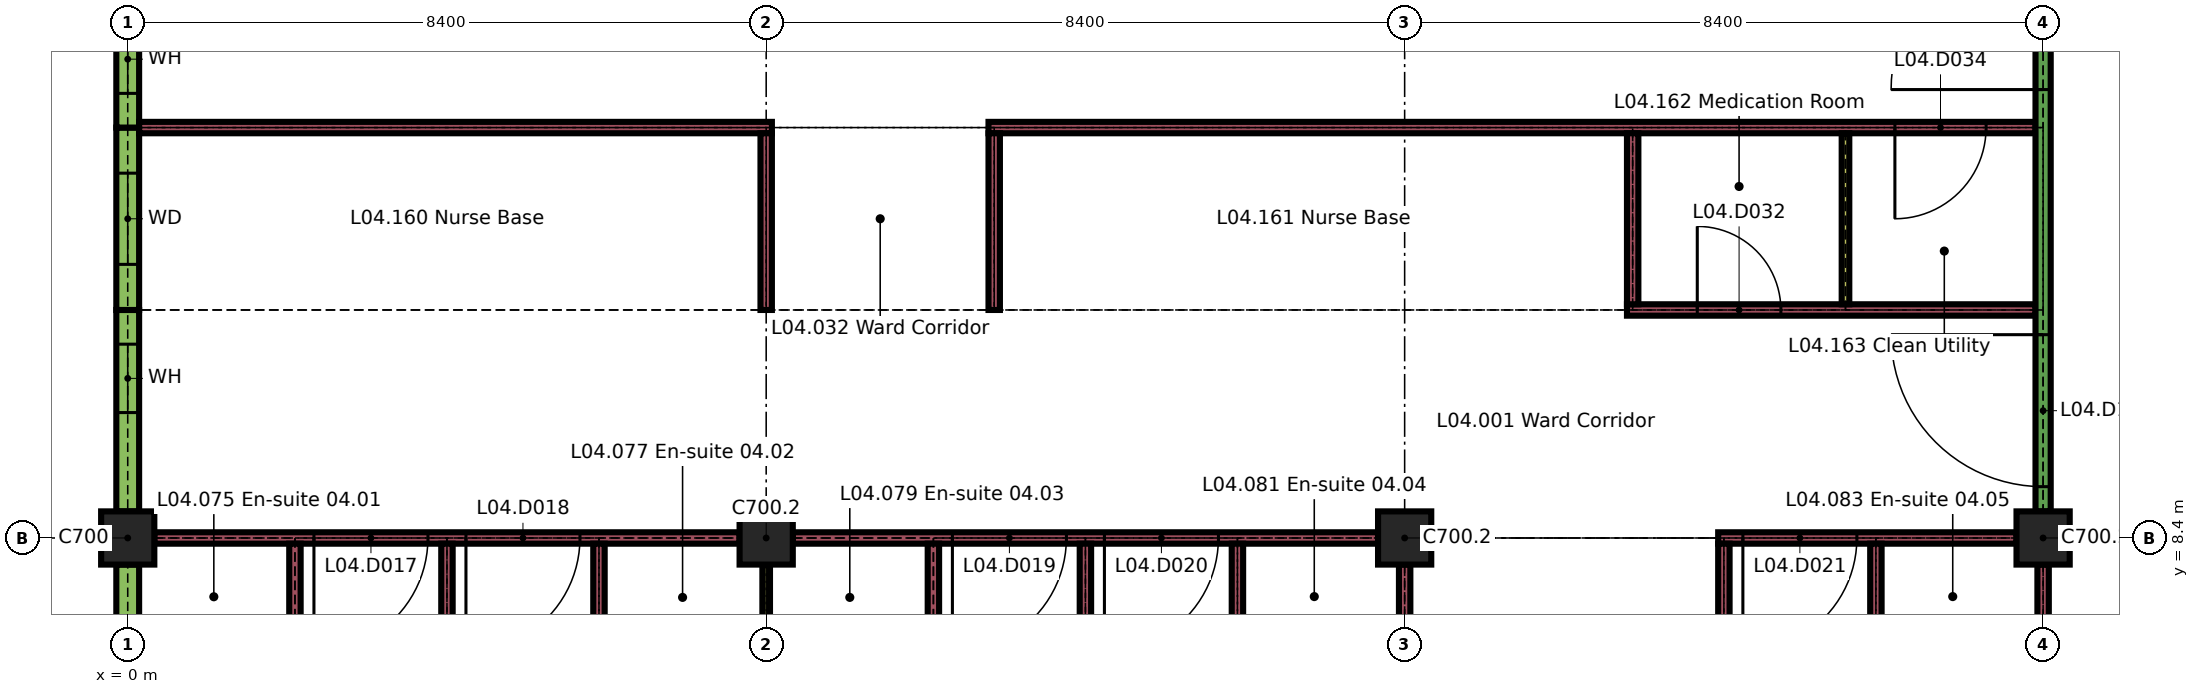
"""IFC4 building model, lengths in metres.
Left out: names, types, materials, properties, quantities, classifications, styles, units other than length and angle.
Written with IfcOpenShell. Run it as: python <this file> out.ifc"""

import sys

from ifc_helpers import new_model, si_unit, direction, frame, frame_2d, origin, origin_2d, place, context, subcontext, project, spatial, rectangle, extrude, element, fill, save


model = new_model("IFC4")
c1 = context("Model", 3, precision=1e-05, world=origin(), true_north=direction((0.0, 1.0)))
c2 = subcontext(c1, "Body", "Model", "MODEL_VIEW")
j1 = project(units=[si_unit("LENGTHUNIT", "METRE"), si_unit("PLANEANGLEUNIT", "RADIAN")], contexts=[c1])
p1 = place(None, origin())
s1 = spatial("IfcSite", under=j1, at=p1, CompositionType="ELEMENT")
p2 = place(p1, origin())
s2 = spatial("IfcBuilding", under=s1, at=p2, CompositionType="ELEMENT")
p3 = place(p2, frame((0.0, 0.0, 18.9)))
s3 = spatial("IfcBuildingStorey", under=s2, at=p3, CompositionType="ELEMENT", Elevation=18.9)
for number, where, z_axis, x_axis in (
    (1, (0.0, 8.4, 0.0), (0.0, 0.0, 1.0), (1.0, 0.0, 0.0)),
    (2, (8.4, 8.4, 0.0), (0.0, 0.0, 1.0), (1.0, 0.0, 0.0)),
    (3, (16.8, 8.4, 0.0), (0.0, 0.0, 1.0), (1.0, 0.0, 0.0)),
    (4, (25.2, 8.4, 0.0), (0.0, 0.0, 1.0), (1.0, 0.0, 0.0)),
):
    element("IfcColumn", number, at=place(p3, frame(where, z_axis=z_axis, x_axis=x_axis)), inside=s3, PredefinedType="COLUMN", context=c2, shape_type="SweptSolid", body=[
        extrude(rectangle(XDim=0.7, YDim=0.7, at=origin_2d()), origin(), (0.0, 0.0, 1.0), 3.26),
    ])
p4 = place(p3, frame((0.0, 6.0, 0.0), z_axis=(0.0, 0.0, 1.0), x_axis=(0.0, 1.0, 0.0)))
e5 = element("IfcWall", 5, at=p4, inside=s3, PredefinedType="SOLIDWALL", context=c2, shape_type="SweptSolid", body=[
    extrude(rectangle(XDim=2.05, YDim=0.3, at=frame_2d((1.025, 0.0))), origin(), (0.0, 0.0, 1.0), 2.96),
])
p5 = place(p3, frame((0.0, 8.75, 0.0), z_axis=(0.0, 0.0, 1.0), x_axis=(0.0, 1.0, 0.0)))
e6 = element("IfcWall", 6, at=p5, inside=s3, PredefinedType="SOLIDWALL", context=c2, shape_type="SweptSolid", body=[
    extrude(rectangle(XDim=2.65, YDim=0.3, at=frame_2d((1.325, 0.0))), origin(), (0.0, 0.0, 1.0), 2.96),
])
p6 = place(p5, frame((1.3, 0.0, 0.9)))
e7 = element("IfcOpeningElement", 7, at=p6, cuts=e6, PredefinedType="OPENING", context=c2, shape_type="SweptSolid", body=[
    extrude(rectangle(XDim=0.9, YDim=1.5, at=frame_2d((0.45, 0.75))), frame((0.0, 0.16, 0.0), z_axis=(0.0, -1.0, 0.0), x_axis=(1.0, 0.0, 0.0)), (0.0, 0.0, 1.0), 0.32),
])
p7 = place(p3, frame((0.0, 11.4, 0.0), z_axis=(0.0, 0.0, 1.0), x_axis=(0.0, 1.0, 0.0)))
e8 = element("IfcWall", 8, at=p7, inside=s3, PredefinedType="SOLIDWALL", context=c2, shape_type="SweptSolid", body=[
    extrude(rectangle(XDim=2.4, YDim=0.3, at=frame_2d((1.2, 0.0))), origin(), (0.0, 0.0, 1.0), 2.96),
])
p8 = place(p7, frame((0.6, 0.0, 0.9)))
e9 = element("IfcOpeningElement", 9, at=p8, cuts=e8, PredefinedType="OPENING", context=c2, shape_type="SweptSolid", body=[
    extrude(rectangle(XDim=1.2, YDim=1.5, at=frame_2d((0.6, 0.75))), frame((0.0, 0.16, 0.0), z_axis=(0.0, -1.0, 0.0), x_axis=(1.0, 0.0, 0.0)), (0.0, 0.0, 1.0), 0.32),
])
p9 = place(p3, frame((0.0, 13.8, 0.0), z_axis=(0.0, 0.0, 1.0), x_axis=(0.0, 1.0, 0.0)))
e10 = element("IfcWall", 10, at=p9, inside=s3, PredefinedType="SOLIDWALL", context=c2, shape_type="SweptSolid", body=[
    extrude(rectangle(XDim=3.0, YDim=0.3, at=frame_2d((1.5, 0.0))), origin(), (0.0, 0.0, 1.0), 2.96),
])
p10 = place(p9, frame((0.45, 0.0, 0.9)))
e11 = element("IfcOpeningElement", 11, at=p10, cuts=e10, PredefinedType="OPENING", context=c2, shape_type="SweptSolid", body=[
    extrude(rectangle(XDim=0.9, YDim=1.5, at=frame_2d((0.45, 0.75))), frame((0.0, 0.16, 0.0), z_axis=(0.0, -1.0, 0.0), x_axis=(1.0, 0.0, 0.0)), (0.0, 0.0, 1.0), 0.32),
])
p11 = place(p3, frame((0.35, 8.4, 0.0), z_axis=(0.0, 0.0, 1.0), x_axis=(1.0, 0.0, 0.0)))
e12 = element("IfcWall", 12, at=p11, inside=s3, PredefinedType="PARTITIONING", context=c2, shape_type="SweptSolid", body=[
    extrude(rectangle(XDim=7.7, YDim=0.15, at=frame_2d((3.85, 0.0))), origin(), (0.0, 0.0, 1.0), 3.26),
])
p12 = place(p11, frame((2.1, 0.0, 0.0)))
e13 = element("IfcOpeningElement", 13, at=p12, cuts=e12, PredefinedType="OPENING", context=c2, shape_type="SweptSolid", body=[
    extrude(rectangle(XDim=1.5, YDim=2.4, at=frame_2d((0.75, 1.2))), frame((0.0, 0.085, 0.0), z_axis=(0.0, -1.0, 0.0), x_axis=(1.0, 0.0, 0.0)), (0.0, 0.0, 1.0), 0.17),
])
p13 = place(p11, frame((4.1, 0.0, 0.0)))
e14 = element("IfcOpeningElement", 14, at=p13, cuts=e12, PredefinedType="OPENING", context=c2, shape_type="SweptSolid", body=[
    extrude(rectangle(XDim=1.5, YDim=2.4, at=frame_2d((0.75, 1.2))), frame((0.0, 0.085, 0.0), z_axis=(0.0, -1.0, 0.0), x_axis=(1.0, 0.0, 0.0)), (0.0, 0.0, 1.0), 0.17),
])
p14 = place(p3, frame((8.75, 8.4, 0.0), z_axis=(0.0, 0.0, 1.0), x_axis=(1.0, 0.0, 0.0)))
e15 = element("IfcWall", 15, at=p14, inside=s3, PredefinedType="PARTITIONING", context=c2, shape_type="SweptSolid", body=[
    extrude(rectangle(XDim=7.7, YDim=0.15, at=frame_2d((3.85, 0.0))), origin(), (0.0, 0.0, 1.0), 3.26),
])
p15 = place(p14, frame((2.1, 0.0, 0.0)))
e16 = element("IfcOpeningElement", 16, at=p15, cuts=e15, PredefinedType="OPENING", context=c2, shape_type="SweptSolid", body=[
    extrude(rectangle(XDim=1.5, YDim=2.4, at=frame_2d((0.75, 1.2))), frame((0.0, 0.085, 0.0), z_axis=(0.0, -1.0, 0.0), x_axis=(1.0, 0.0, 0.0)), (0.0, 0.0, 1.0), 0.17),
])
p16 = place(p14, frame((4.1, 0.0, 0.0)))
e17 = element("IfcOpeningElement", 17, at=p16, cuts=e15, PredefinedType="OPENING", context=c2, shape_type="SweptSolid", body=[
    extrude(rectangle(XDim=1.5, YDim=2.4, at=frame_2d((0.75, 1.2))), frame((0.0, 0.085, 0.0), z_axis=(0.0, -1.0, 0.0), x_axis=(1.0, 0.0, 0.0)), (0.0, 0.0, 1.0), 0.17),
])
p17 = place(p3, frame((20.925, 8.4, 0.0), z_axis=(0.0, 0.0, 1.0), x_axis=(1.0, 0.0, 0.0)))
e18 = element("IfcWall", 18, at=p17, inside=s3, PredefinedType="PARTITIONING", context=c2, shape_type="SweptSolid", body=[
    extrude(rectangle(XDim=3.925, YDim=0.15, at=frame_2d((1.962, 0.0))), origin(), (0.0, 0.0, 1.0), 3.26),
])
p18 = place(p17, frame((0.325, 0.0, 0.0)))
e19 = element("IfcOpeningElement", 19, at=p18, cuts=e18, PredefinedType="OPENING", context=c2, shape_type="SweptSolid", body=[
    extrude(rectangle(XDim=1.5, YDim=2.4, at=frame_2d((0.75, 1.2))), frame((0.0, 0.085, 0.0), z_axis=(0.0, -1.0, 0.0), x_axis=(1.0, 0.0, 0.0)), (0.0, 0.0, 1.0), 0.17),
])
p19 = place(p3, frame((19.725, 11.4, 0.0), z_axis=(0.0, 0.0, 1.0), x_axis=(1.0, 0.0, 0.0)))
e20 = element("IfcWall", 20, at=p19, inside=s3, PredefinedType="PARTITIONING", context=c2, shape_type="SweptSolid", body=[
    extrude(rectangle(XDim=5.375, YDim=0.15, at=frame_2d((2.688, 0.0))), origin(), (0.0, 0.0, 1.0), 3.26),
])
p20 = place(p19, frame((0.925, 0.0, 0.0)))
e21 = element("IfcOpeningElement", 21, at=p20, cuts=e20, PredefinedType="OPENING", context=c2, shape_type="SweptSolid", body=[
    extrude(rectangle(XDim=1.1, YDim=2.1, at=frame_2d((0.55, 1.05))), frame((0.0, 0.085, 0.0), z_axis=(0.0, -1.0, 0.0), x_axis=(1.0, 0.0, 0.0)), (0.0, 0.0, 1.0), 0.17),
])
p21 = place(p3, frame((0.15, 13.8, 0.0), z_axis=(0.0, 0.0, 1.0), x_axis=(1.0, 0.0, 0.0)))
e22 = element("IfcWall", 22, at=p21, inside=s3, PredefinedType="PARTITIONING", context=c2, shape_type="SweptSolid", body=[
    extrude(rectangle(XDim=8.325, YDim=0.15, at=frame_2d((4.163, 0.0))), origin(), (0.0, 0.0, 1.0), 3.26),
])
p22 = place(p3, frame((11.325, 13.8, 0.0), z_axis=(0.0, 0.0, 1.0), x_axis=(1.0, 0.0, 0.0)))
e23 = element("IfcWall", 23, at=p22, inside=s3, PredefinedType="PARTITIONING", context=c2, shape_type="SweptSolid", body=[
    extrude(rectangle(XDim=13.775, YDim=0.15, at=frame_2d((6.888, 0.0))), origin(), (0.0, 0.0, 1.0), 3.26),
])
p23 = place(p22, frame((11.925, 0.0, 0.0)))
e24 = element("IfcOpeningElement", 24, at=p23, cuts=e23, PredefinedType="OPENING", context=c2, shape_type="SweptSolid", body=[
    extrude(rectangle(XDim=1.2, YDim=2.1, at=frame_2d((0.6, 1.05))), frame((0.0, 0.085, 0.0), z_axis=(0.0, -1.0, 0.0), x_axis=(1.0, 0.0, 0.0)), (0.0, 0.0, 1.0), 0.17),
])
p24 = place(p3, frame((2.2, 6.075, 0.0), z_axis=(0.0, 0.0, 1.0), x_axis=(0.0, 1.0, 0.0)))
e25 = element("IfcWall", 25, at=p24, inside=s3, PredefinedType="PARTITIONING", context=c2, shape_type="SweptSolid", body=[
    extrude(rectangle(XDim=2.25, YDim=0.15, at=frame_2d((1.125, 0.0))), origin(), (0.0, 0.0, 1.0), 3.26),
])
p25 = place(p3, frame((4.2, 0.15, 0.0), z_axis=(0.0, 0.0, 1.0), x_axis=(0.0, 1.0, 0.0)))
e26 = element("IfcWall", 26, at=p25, inside=s3, PredefinedType="PARTITIONING", context=c2, shape_type="SweptSolid", body=[
    extrude(rectangle(XDim=8.175, YDim=0.15, at=frame_2d((4.087, 0.0))), origin(), (0.0, 0.0, 1.0), 3.26),
])
p26 = place(p3, frame((6.2, 6.075, 0.0), z_axis=(0.0, 0.0, 1.0), x_axis=(0.0, 1.0, 0.0)))
e27 = element("IfcWall", 27, at=p26, inside=s3, PredefinedType="PARTITIONING", context=c2, shape_type="SweptSolid", body=[
    extrude(rectangle(XDim=2.25, YDim=0.15, at=frame_2d((1.125, 0.0))), origin(), (0.0, 0.0, 1.0), 3.26),
])
p27 = place(p3, frame((8.4, 6.075, 0.0), z_axis=(0.0, 0.0, 1.0), x_axis=(0.0, 1.0, 0.0)))
e28 = element("IfcWall", 28, at=p27, inside=s3, PredefinedType="PARTITIONING", context=c2, shape_type="SweptSolid", body=[
    extrude(rectangle(XDim=1.975, YDim=0.1, at=frame_2d((0.988, 0.0))), origin(), (0.0, 0.0, 1.0), 3.26),
])
p28 = place(p3, frame((8.4, 11.4, 0.0), z_axis=(0.0, 0.0, 1.0), x_axis=(0.0, 1.0, 0.0)))
e29 = element("IfcWall", 29, at=p28, inside=s3, PredefinedType="PARTITIONING", context=c2, shape_type="SweptSolid", body=[
    extrude(rectangle(XDim=2.325, YDim=0.15, at=frame_2d((1.163, 0.0))), origin(), (0.0, 0.0, 1.0), 3.26),
])
p29 = place(p3, frame((10.6, 6.075, 0.0), z_axis=(0.0, 0.0, 1.0), x_axis=(0.0, 1.0, 0.0)))
e30 = element("IfcWall", 30, at=p29, inside=s3, PredefinedType="PARTITIONING", context=c2, shape_type="SweptSolid", body=[
    extrude(rectangle(XDim=2.25, YDim=0.15, at=frame_2d((1.125, 0.0))), origin(), (0.0, 0.0, 1.0), 3.26),
])
p30 = place(p3, frame((11.4, 11.4, 0.0), z_axis=(0.0, 0.0, 1.0), x_axis=(0.0, 1.0, 0.0)))
e31 = element("IfcWall", 31, at=p30, inside=s3, PredefinedType="PARTITIONING", context=c2, shape_type="SweptSolid", body=[
    extrude(rectangle(XDim=2.325, YDim=0.15, at=frame_2d((1.163, 0.0))), origin(), (0.0, 0.0, 1.0), 3.26),
])
p31 = place(p3, frame((12.6, 0.15, 0.0), z_axis=(0.0, 0.0, 1.0), x_axis=(0.0, 1.0, 0.0)))
e32 = element("IfcWall", 32, at=p31, inside=s3, PredefinedType="PARTITIONING", context=c2, shape_type="SweptSolid", body=[
    extrude(rectangle(XDim=8.175, YDim=0.15, at=frame_2d((4.087, 0.0))), origin(), (0.0, 0.0, 1.0), 3.26),
])
p32 = place(p3, frame((14.6, 6.075, 0.0), z_axis=(0.0, 0.0, 1.0), x_axis=(0.0, 1.0, 0.0)))
e33 = element("IfcWall", 33, at=p32, inside=s3, PredefinedType="PARTITIONING", context=c2, shape_type="SweptSolid", body=[
    extrude(rectangle(XDim=2.25, YDim=0.15, at=frame_2d((1.125, 0.0))), origin(), (0.0, 0.0, 1.0), 3.26),
])
p33 = place(p3, frame((16.8, 0.35, 0.0), z_axis=(0.0, 0.0, 1.0), x_axis=(0.0, 1.0, 0.0)))
e34 = element("IfcWall", 34, at=p33, inside=s3, PredefinedType="PARTITIONING", context=c2, shape_type="SweptSolid", body=[
    extrude(rectangle(XDim=7.7, YDim=0.15, at=frame_2d((3.85, 0.0))), origin(), (0.0, 0.0, 1.0), 3.26),
])
p34 = place(p3, frame((19.8, 11.475, 0.0), z_axis=(0.0, 0.0, 1.0), x_axis=(0.0, 1.0, 0.0)))
e35 = element("IfcWall", 35, at=p34, inside=s3, PredefinedType="PARTITIONING", context=c2, shape_type="SweptSolid", body=[
    extrude(rectangle(XDim=2.25, YDim=0.15, at=frame_2d((1.125, 0.0))), origin(), (0.0, 0.0, 1.0), 3.26),
])
p35 = place(p3, frame((21.0, 0.15, 0.0), z_axis=(0.0, 0.0, 1.0), x_axis=(0.0, 1.0, 0.0)))
e36 = element("IfcWall", 36, at=p35, inside=s3, PredefinedType="PARTITIONING", context=c2, shape_type="SweptSolid", body=[
    extrude(rectangle(XDim=8.175, YDim=0.15, at=frame_2d((4.087, 0.0))), origin(), (0.0, 0.0, 1.0), 3.26),
])
p36 = place(p3, frame((22.6, 11.475, 0.0), z_axis=(0.0, 0.0, 1.0), x_axis=(0.0, 1.0, 0.0)))
e37 = element("IfcWall", 37, at=p36, inside=s3, PredefinedType="PARTITIONING", context=c2, shape_type="SweptSolid", body=[
    extrude(rectangle(XDim=2.25, YDim=0.1, at=frame_2d((1.125, 0.0))), origin(), (0.0, 0.0, 1.0), 3.26),
])
p37 = place(p3, frame((23.0, 6.075, 0.0), z_axis=(0.0, 0.0, 1.0), x_axis=(0.0, 1.0, 0.0)))
e38 = element("IfcWall", 38, at=p37, inside=s3, PredefinedType="PARTITIONING", context=c2, shape_type="SweptSolid", body=[
    extrude(rectangle(XDim=2.25, YDim=0.15, at=frame_2d((1.125, 0.0))), origin(), (0.0, 0.0, 1.0), 3.26),
])
p38 = place(p3, frame((25.2, 0.35, 0.0), z_axis=(0.0, 0.0, 1.0), x_axis=(0.0, 1.0, 0.0)))
e39 = element("IfcWall", 39, at=p38, inside=s3, PredefinedType="PARTITIONING", context=c2, shape_type="SweptSolid", body=[
    extrude(rectangle(XDim=7.7, YDim=0.15, at=frame_2d((3.85, 0.0))), origin(), (0.0, 0.0, 1.0), 3.26),
])
p39 = place(p3, frame((25.2, 8.75, 0.0), z_axis=(0.0, 0.0, 1.0), x_axis=(0.0, 1.0, 0.0)))
e40 = element("IfcWall", 40, at=p39, inside=s3, PredefinedType="PARTITIONING", context=c2, shape_type="SweptSolid", body=[
    extrude(rectangle(XDim=12.85, YDim=0.2, at=frame_2d((6.425, 0.0))), origin(), (0.0, 0.0, 1.0), 3.26),
])
p40 = place(p39, frame((0.325, 0.0, 0.0)))
e41 = element("IfcOpeningElement", 41, at=p40, cuts=e40, PredefinedType="OPENING", context=c2, shape_type="SweptSolid", body=[
    extrude(rectangle(XDim=2.0, YDim=2.4, at=frame_2d((1.0, 1.2))), frame((0.0, 0.11, 0.0), z_axis=(0.0, -1.0, 0.0), x_axis=(1.0, 0.0, 0.0)), (0.0, 0.0, 1.0), 0.22),
])
p41 = place(p39, frame((5.55, 0.0, 0.0)))
e42 = element("IfcOpeningElement", 42, at=p41, cuts=e40, PredefinedType="OPENING", context=c2, shape_type="SweptSolid", body=[
    extrude(rectangle(XDim=2.0, YDim=2.4, at=frame_2d((1.0, 1.2))), frame((0.0, 0.11, 0.0), z_axis=(0.0, -1.0, 0.0), x_axis=(1.0, 0.0, 0.0)), (0.0, 0.0, 1.0), 0.22),
])
p42 = place(p6, origin())
e43 = element("IfcWindow", 43, at=p42, inside=s3, PartitioningType="SINGLE_PANEL", PredefinedType="WINDOW", context=c2, shape_type="SweptSolid", body=[
    extrude(rectangle(XDim=0.9, YDim=1.5, at=frame_2d((0.45, 0.75))), frame((0.0, 0.03, 0.0), z_axis=(0.0, -1.0, 0.0), x_axis=(1.0, 0.0, 0.0)), (0.0, 0.0, 1.0), 0.06),
])
fill(e7, e43)
p43 = place(p8, origin())
e44 = element("IfcWindow", 44, at=p43, inside=s3, PartitioningType="SINGLE_PANEL", PredefinedType="WINDOW", context=c2, shape_type="SweptSolid", body=[
    extrude(rectangle(XDim=1.2, YDim=1.5, at=frame_2d((0.6, 0.75))), frame((0.0, 0.03, 0.0), z_axis=(0.0, -1.0, 0.0), x_axis=(1.0, 0.0, 0.0)), (0.0, 0.0, 1.0), 0.06),
])
fill(e9, e44)
p44 = place(p10, origin())
e45 = element("IfcWindow", 45, at=p44, inside=s3, PartitioningType="SINGLE_PANEL", PredefinedType="WINDOW", context=c2, shape_type="SweptSolid", body=[
    extrude(rectangle(XDim=0.9, YDim=1.5, at=frame_2d((0.45, 0.75))), frame((0.0, 0.03, 0.0), z_axis=(0.0, -1.0, 0.0), x_axis=(1.0, 0.0, 0.0)), (0.0, 0.0, 1.0), 0.06),
])
fill(e11, e45)
p45 = place(p12, origin())
e46 = element("IfcDoor", 46, at=p45, inside=s3, OperationType="SINGLE_SWING_LEFT", PredefinedType="DOOR", context=c2, shape_type="SweptSolid", body=[
    extrude(rectangle(XDim=1.5, YDim=2.4, at=frame_2d((0.75, 1.2))), frame((0.0, 0.03, 0.0), z_axis=(0.0, -1.0, 0.0), x_axis=(1.0, 0.0, 0.0)), (0.0, 0.0, 1.0), 0.06),
])
fill(e13, e46)
p46 = place(p13, origin())
e47 = element("IfcDoor", 47, at=p46, inside=s3, OperationType="SINGLE_SWING_LEFT", PredefinedType="DOOR", context=c2, shape_type="SweptSolid", body=[
    extrude(rectangle(XDim=1.5, YDim=2.4, at=frame_2d((0.75, 1.2))), frame((0.0, 0.03, 0.0), z_axis=(0.0, -1.0, 0.0), x_axis=(1.0, 0.0, 0.0)), (0.0, 0.0, 1.0), 0.06),
])
fill(e14, e47)
p47 = place(p15, origin())
e48 = element("IfcDoor", 48, at=p47, inside=s3, OperationType="SINGLE_SWING_LEFT", PredefinedType="DOOR", context=c2, shape_type="SweptSolid", body=[
    extrude(rectangle(XDim=1.5, YDim=2.4, at=frame_2d((0.75, 1.2))), frame((0.0, 0.03, 0.0), z_axis=(0.0, -1.0, 0.0), x_axis=(1.0, 0.0, 0.0)), (0.0, 0.0, 1.0), 0.06),
])
fill(e16, e48)
p48 = place(p16, origin())
e49 = element("IfcDoor", 49, at=p48, inside=s3, OperationType="SINGLE_SWING_LEFT", PredefinedType="DOOR", context=c2, shape_type="SweptSolid", body=[
    extrude(rectangle(XDim=1.5, YDim=2.4, at=frame_2d((0.75, 1.2))), frame((0.0, 0.03, 0.0), z_axis=(0.0, -1.0, 0.0), x_axis=(1.0, 0.0, 0.0)), (0.0, 0.0, 1.0), 0.06),
])
fill(e17, e49)
p49 = place(p18, origin())
e50 = element("IfcDoor", 50, at=p49, inside=s3, OperationType="SINGLE_SWING_LEFT", PredefinedType="DOOR", context=c2, shape_type="SweptSolid", body=[
    extrude(rectangle(XDim=1.5, YDim=2.4, at=frame_2d((0.75, 1.2))), frame((0.0, 0.03, 0.0), z_axis=(0.0, -1.0, 0.0), x_axis=(1.0, 0.0, 0.0)), (0.0, 0.0, 1.0), 0.06),
])
fill(e19, e50)
p50 = place(p20, origin())
e51 = element("IfcDoor", 51, at=p50, inside=s3, OperationType="SINGLE_SWING_RIGHT", PredefinedType="DOOR", context=c2, shape_type="SweptSolid", body=[
    extrude(rectangle(XDim=1.1, YDim=2.1, at=frame_2d((0.55, 1.05))), frame((0.0, 0.025, 0.0), z_axis=(0.0, -1.0, 0.0), x_axis=(1.0, 0.0, 0.0)), (0.0, 0.0, 1.0), 0.05),
])
fill(e21, e51)
p51 = place(p23, origin())
e52 = element("IfcDoor", 52, at=p51, inside=s3, OperationType="SINGLE_SWING_LEFT", PredefinedType="DOOR", context=c2, shape_type="SweptSolid", body=[
    extrude(rectangle(XDim=1.2, YDim=2.1, at=frame_2d((0.6, 1.05))), frame((0.0, 0.025, 0.0), z_axis=(0.0, -1.0, 0.0), x_axis=(1.0, 0.0, 0.0)), (0.0, 0.0, 1.0), 0.05),
])
fill(e24, e52)
p52 = place(p40, origin())
e53 = element("IfcDoor", 53, at=p52, inside=s3, OperationType="SINGLE_SWING_LEFT", PredefinedType="DOOR", context=c2, shape_type="SweptSolid", body=[
    extrude(rectangle(XDim=2.0, YDim=2.4, at=frame_2d((1.0, 1.2))), frame((0.0, 0.03, 0.0), z_axis=(0.0, -1.0, 0.0), x_axis=(1.0, 0.0, 0.0)), (0.0, 0.0, 1.0), 0.06),
])
fill(e41, e53)
p53 = place(p41, origin())
e54 = element("IfcDoor", 54, at=p53, inside=s3, OperationType="SINGLE_SWING_RIGHT", PredefinedType="DOOR", context=c2, shape_type="SweptSolid", body=[
    extrude(rectangle(XDim=2.0, YDim=2.4, at=frame_2d((1.0, 1.2))), frame((0.0, 0.03, 0.0), z_axis=(0.0, -1.0, 0.0), x_axis=(1.0, 0.0, 0.0)), (0.0, 0.0, 1.0), 0.06),
])
fill(e42, e54)
save(model, sys.argv[1])
